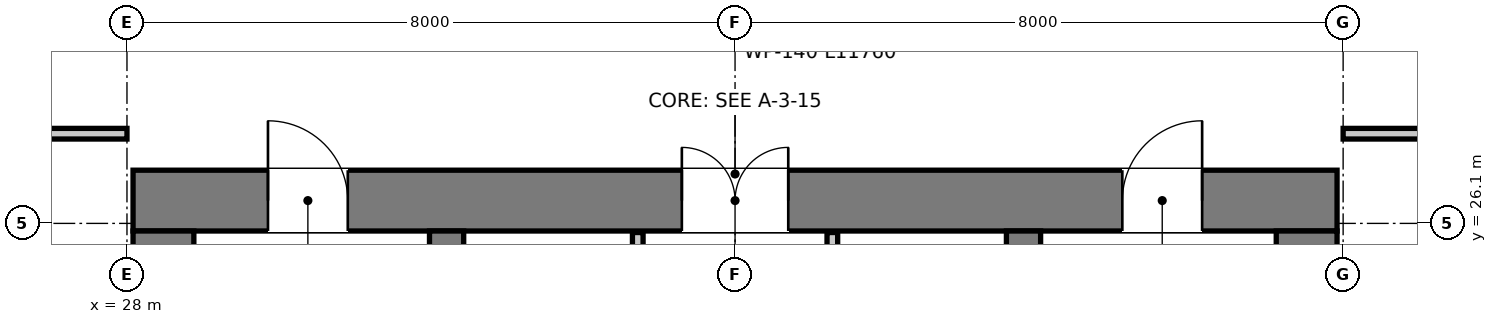
"""IFC4 building model, lengths in metres.
Left out: names, types, materials, properties, quantities, classifications, styles, units other than length and angle.
Written with IfcOpenShell. Run it as: python <this file> out.ifc"""

import sys

from ifc_helpers import new_model, si_unit, direction, frame, frame_2d, origin, place, context, subcontext, project, spatial, rectangle, extrude, element, fill, save


model = new_model("IFC4")
c1 = context("Model", 3, precision=1e-05, world=origin(), true_north=direction((0.0, 1.0)))
c2 = subcontext(c1, "Body", "Model", "MODEL_VIEW")
j1 = project(units=[si_unit("LENGTHUNIT", "METRE"), si_unit("PLANEANGLEUNIT", "RADIAN")], contexts=[c1])
p1 = place(None, origin())
s1 = spatial("IfcSite", under=j1, at=p1, CompositionType="ELEMENT")
p2 = place(p1, origin())
s2 = spatial("IfcBuilding", under=s1, at=p2, CompositionType="ELEMENT")
p3 = place(p2, frame((0.0, 0.0, 227.05)))
s3 = spatial("IfcBuildingStorey", under=s2, at=p3, CompositionType="ELEMENT", Elevation=227.05)
p4 = place(p3, frame((28.08, 26.4, 0.0), z_axis=(0.0, 0.0, 1.0), x_axis=(1.0, 0.0, 0.0)))
e1 = element("IfcWall", 1, at=p4, inside=s3, PredefinedType="SHEAR", context=c2, shape_type="SweptSolid", body=[
    extrude(rectangle(XDim=15.84, YDim=0.8, at=frame_2d((7.92, 0.0))), origin(), (0.0, 0.0, 1.0), 3.95),
])
p5 = place(p4, frame((7.22, 0.0, 0.0)))
e2 = element("IfcOpeningElement", 2, at=p5, cuts=e1, PredefinedType="OPENING", context=c2, shape_type="SweptSolid", body=[
    extrude(rectangle(XDim=1.4, YDim=2.2, at=frame_2d((0.7, 1.1))), frame((0.0, 0.41, 0.0), z_axis=(0.0, -1.0, 0.0), x_axis=(1.0, 0.0, 0.0)), (0.0, 0.0, 1.0), 0.82),
])
p6 = place(p4, frame((1.775, 0.0, 0.0)))
e3 = element("IfcOpeningElement", 3, at=p6, cuts=e1, PredefinedType="OPENING", context=c2, shape_type="SweptSolid", body=[
    extrude(rectangle(XDim=1.05, YDim=2.1, at=frame_2d((0.525, 1.05))), frame((0.0, 0.41, 0.0), z_axis=(0.0, -1.0, 0.0), x_axis=(1.0, 0.0, 0.0)), (0.0, 0.0, 1.0), 0.82),
])
p7 = place(p4, frame((13.015, 0.0, 0.0)))
e4 = element("IfcOpeningElement", 4, at=p7, cuts=e1, PredefinedType="OPENING", context=c2, shape_type="SweptSolid", body=[
    extrude(rectangle(XDim=1.05, YDim=2.1, at=frame_2d((0.525, 1.05))), frame((0.0, 0.41, 0.0), z_axis=(0.0, -1.0, 0.0), x_axis=(1.0, 0.0, 0.0)), (0.0, 0.0, 1.0), 0.82),
])
for number, where, z_axis, x_axis in (
    (5, (28.48, 11.3, 0.0), (0.0, 0.0, 1.0), (0.0, 1.0, 0.0)),
    (6, (43.52, 11.3, 0.0), (0.0, 0.0, 1.0), (0.0, 1.0, 0.0)),
):
    element("IfcWall", number, at=place(p3, frame(where, z_axis=z_axis, x_axis=x_axis)), inside=s3, PredefinedType="SHEAR", context=c2, shape_type="SweptSolid", body=[
        extrude(rectangle(XDim=14.7, YDim=0.8, at=frame_2d((7.35, 0.0))), origin(), (0.0, 0.0, 1.0), 3.95),
    ])
p8 = place(p3, frame((32.205, 13.22, 0.0), z_axis=(0.0, 0.0, 1.0), x_axis=(0.0, 1.0, 0.0)))
e7 = element("IfcWall", 7, at=p8, inside=s3, PredefinedType="SHEAR", context=c2, shape_type="SweptSolid", body=[
    extrude(rectangle(XDim=12.78, YDim=0.45, at=frame_2d((6.39, 0.0))), origin(), (0.0, 0.0, 1.0), 3.95),
])
p9 = place(p8, frame((10.58, 0.0, 0.0)))
e8 = element("IfcOpeningElement", 8, at=p9, cuts=e7, PredefinedType="OPENING", context=c2, shape_type="SweptSolid", body=[
    extrude(rectangle(XDim=1.1, YDim=2.15, at=frame_2d((0.55, 1.075))), frame((0.0, 0.235, 0.0), z_axis=(0.0, -1.0, 0.0), x_axis=(1.0, 0.0, 0.0)), (0.0, 0.0, 1.0), 0.47),
])
p10 = place(p3, frame((39.795, 13.22, 0.0), z_axis=(0.0, 0.0, 1.0), x_axis=(0.0, 1.0, 0.0)))
e9 = element("IfcWall", 9, at=p10, inside=s3, PredefinedType="SHEAR", context=c2, shape_type="SweptSolid", body=[
    extrude(rectangle(XDim=12.78, YDim=0.45, at=frame_2d((6.39, 0.0))), origin(), (0.0, 0.0, 1.0), 3.95),
])
p11 = place(p10, frame((10.58, 0.0, 0.0)))
e10 = element("IfcOpeningElement", 10, at=p11, cuts=e9, PredefinedType="OPENING", context=c2, shape_type="SweptSolid", body=[
    extrude(rectangle(XDim=1.1, YDim=2.15, at=frame_2d((0.55, 1.075))), frame((0.0, 0.235, 0.0), z_axis=(0.0, -1.0, 0.0), x_axis=(1.0, 0.0, 0.0)), (0.0, 0.0, 1.0), 0.47),
])
p12 = place(p3, frame((34.72, 20.2, 0.0), z_axis=(0.0, 0.0, 1.0), x_axis=(0.0, 1.0, 0.0)))
e11 = element("IfcWall", 11, at=p12, inside=s3, PredefinedType="PARTITIONING", context=c2, shape_type="SweptSolid", body=[
    extrude(rectangle(XDim=5.78, YDim=0.14, at=frame_2d((2.89, 0.0))), origin(), (0.0, 0.0, 1.0), 2.67),
])
p13 = place(p12, frame((1.05, 0.0, 0.0)))
e12 = element("IfcOpeningElement", 12, at=p13, cuts=e11, PredefinedType="OPENING", context=c2, shape_type="SweptSolid", body=[
    extrude(rectangle(XDim=0.9, YDim=2.1, at=frame_2d((0.45, 1.05))), frame((0.0, 0.08, 0.0), z_axis=(0.0, -1.0, 0.0), x_axis=(1.0, 0.0, 0.0)), (0.0, 0.0, 1.0), 0.16),
])
p14 = place(p3, frame((37.28, 20.2, 0.0), z_axis=(0.0, 0.0, 1.0), x_axis=(0.0, 1.0, 0.0)))
e13 = element("IfcWall", 13, at=p14, inside=s3, PredefinedType="PARTITIONING", context=c2, shape_type="SweptSolid", body=[
    extrude(rectangle(XDim=5.78, YDim=0.14, at=frame_2d((2.89, 0.0))), origin(), (0.0, 0.0, 1.0), 2.67),
])
p15 = place(p14, frame((0.95, 0.0, 0.0)))
e14 = element("IfcOpeningElement", 14, at=p15, cuts=e13, PredefinedType="OPENING", context=c2, shape_type="SweptSolid", body=[
    extrude(rectangle(XDim=1.1, YDim=2.15, at=frame_2d((0.55, 1.075))), frame((0.0, 0.08, 0.0), z_axis=(0.0, -1.0, 0.0), x_axis=(1.0, 0.0, 0.0)), (0.0, 0.0, 1.0), 0.16),
])
p16 = place(p3, frame((12.757, 27.28, 0.0), z_axis=(0.0, 0.0, 1.0), x_axis=(1.0, 0.0, 0.0)))
e15 = element("IfcWall", 15, at=p16, inside=s3, PredefinedType="PARTITIONING", context=c2, shape_type="SweptSolid", body=[
    extrude(rectangle(XDim=15.243, YDim=0.14, at=frame_2d((7.622, 0.0))), origin(), (0.0, 0.0, 1.0), 3.03),
])
p17 = place(p16, frame((2.056, 0.0, 0.0)))
e16 = element("IfcOpeningElement", 16, at=p17, cuts=e15, PredefinedType="OPENING", context=c2, shape_type="SweptSolid", body=[
    extrude(rectangle(XDim=0.9, YDim=2.1, at=frame_2d((0.45, 1.05))), frame((0.0, 0.08, 0.0), z_axis=(0.0, -1.0, 0.0), x_axis=(1.0, 0.0, 0.0)), (0.0, 0.0, 1.0), 0.16),
])
p18 = place(p16, frame((9.593, 0.0, 0.0)))
e17 = element("IfcOpeningElement", 17, at=p18, cuts=e15, PredefinedType="OPENING", context=c2, shape_type="SweptSolid", body=[
    extrude(rectangle(XDim=0.9, YDim=2.1, at=frame_2d((0.45, 1.05))), frame((0.0, 0.08, 0.0), z_axis=(0.0, -1.0, 0.0), x_axis=(1.0, 0.0, 0.0)), (0.0, 0.0, 1.0), 0.16),
])
p19 = place(p16, frame((12.493, 0.0, 0.0)))
e18 = element("IfcOpeningElement", 18, at=p19, cuts=e15, PredefinedType="OPENING", context=c2, shape_type="SweptSolid", body=[
    extrude(rectangle(XDim=0.9, YDim=2.1, at=frame_2d((0.45, 1.05))), frame((0.0, 0.08, 0.0), z_axis=(0.0, -1.0, 0.0), x_axis=(1.0, 0.0, 0.0)), (0.0, 0.0, 1.0), 0.16),
])
p20 = place(p3, frame((44.0, 27.28, 0.0), z_axis=(0.0, 0.0, 1.0), x_axis=(1.0, 0.0, 0.0)))
e19 = element("IfcWall", 19, at=p20, inside=s3, PredefinedType="PARTITIONING", context=c2, shape_type="SweptSolid", body=[
    extrude(rectangle(XDim=13.977, YDim=0.14, at=frame_2d((6.988, 0.0))), origin(), (0.0, 0.0, 1.0), 3.03),
])
p21 = place(p20, frame((4.75, 0.0, 0.0)))
e20 = element("IfcOpeningElement", 20, at=p21, cuts=e19, PredefinedType="OPENING", context=c2, shape_type="SweptSolid", body=[
    extrude(rectangle(XDim=0.9, YDim=2.1, at=frame_2d((0.45, 1.05))), frame((0.0, 0.08, 0.0), z_axis=(0.0, -1.0, 0.0), x_axis=(1.0, 0.0, 0.0)), (0.0, 0.0, 1.0), 0.16),
])
p22 = place(p5, origin())
e21 = element("IfcDoor", 21, at=p22, inside=s3, OperationType="DOUBLE_DOOR_SINGLE_SWING", PredefinedType="DOOR", context=c2, shape_type="SweptSolid", body=[
    extrude(rectangle(XDim=1.4, YDim=2.2, at=frame_2d((0.7, 1.1))), frame((0.0, 0.025, 0.0), z_axis=(0.0, -1.0, 0.0), x_axis=(1.0, 0.0, 0.0)), (0.0, 0.0, 1.0), 0.05),
])
fill(e2, e21)
p23 = place(p6, origin())
e22 = element("IfcDoor", 22, at=p23, inside=s3, OperationType="SINGLE_SWING_LEFT", PredefinedType="DOOR", context=c2, shape_type="SweptSolid", body=[
    extrude(rectangle(XDim=1.05, YDim=2.1, at=frame_2d((0.525, 1.05))), frame((0.0, 0.025, 0.0), z_axis=(0.0, -1.0, 0.0), x_axis=(1.0, 0.0, 0.0)), (0.0, 0.0, 1.0), 0.05),
])
fill(e3, e22)
p24 = place(p7, origin())
e23 = element("IfcDoor", 23, at=p24, inside=s3, OperationType="SINGLE_SWING_RIGHT", PredefinedType="DOOR", context=c2, shape_type="SweptSolid", body=[
    extrude(rectangle(XDim=1.05, YDim=2.1, at=frame_2d((0.525, 1.05))), frame((0.0, 0.025, 0.0), z_axis=(0.0, -1.0, 0.0), x_axis=(1.0, 0.0, 0.0)), (0.0, 0.0, 1.0), 0.05),
])
fill(e4, e23)
save(model, sys.argv[1])
